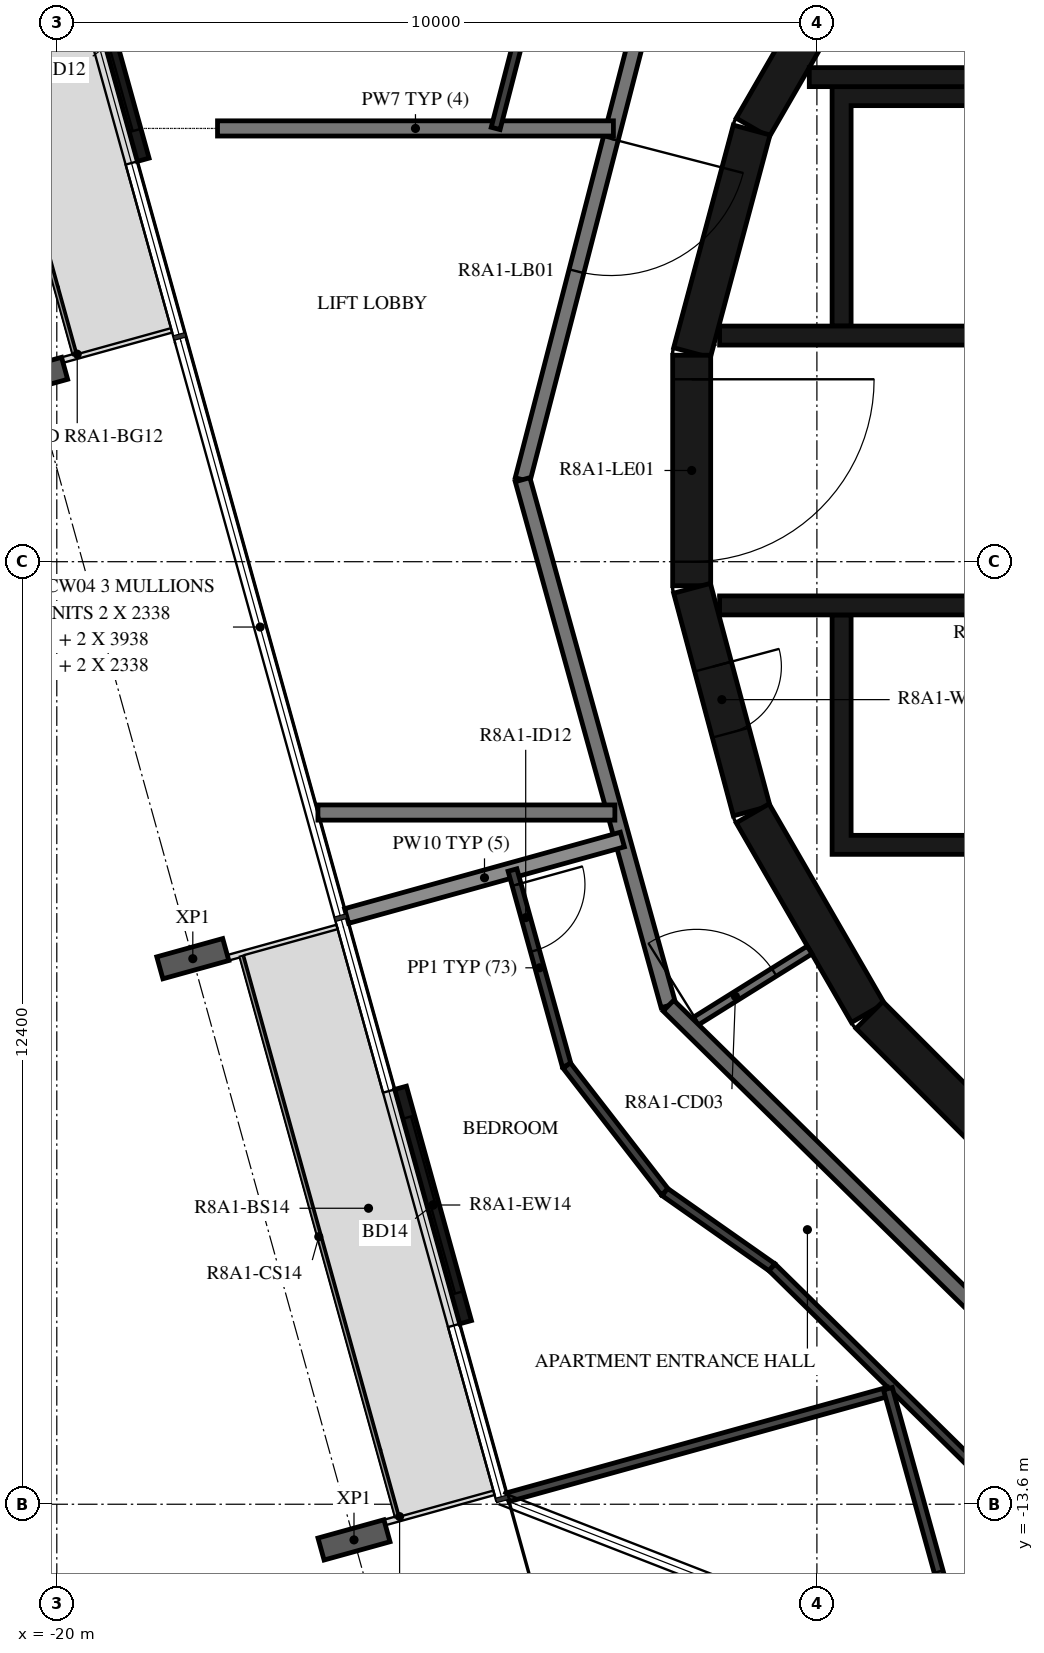
"""IFC4 building model, lengths in metres.
Left out: names, types, materials, properties, quantities, classifications, styles, units other than length and angle.
Written with IfcOpenShell. Run it as: python <this file> out.ifc"""

import sys

from ifc_helpers import new_model, si_unit, direction, frame, frame_2d, origin, origin_2d, place, context, subcontext, project, spatial, polyline, rectangle, i_section, outline, extrude, element, fill, save


model = new_model("IFC4")
c1 = context("Model", 3, precision=1e-05, world=origin(), true_north=direction((0.0, 1.0)))
c2 = subcontext(c1, "Body", "Model", "MODEL_VIEW")
j1 = project(units=[si_unit("LENGTHUNIT", "METRE"), si_unit("PLANEANGLEUNIT", "RADIAN")], contexts=[c1])
p1 = place(None, origin())
s1 = spatial("IfcSite", under=j1, at=p1, CompositionType="ELEMENT")
p2 = place(p1, origin())
s2 = spatial("IfcBuilding", under=s1, at=p2, CompositionType="ELEMENT")
p3 = place(p2, frame((0.0, 0.0, 301.7)))
s3 = spatial("IfcBuildingStorey", under=s2, at=p3, CompositionType="ELEMENT", Elevation=301.7)
for number, where, z_axis, x_axis in (
    (1, (-20.331, 1.224, -0.38), (0.0, 0.0, 1.0), (-0.267, 0.964, 0.0)),
    (2, (-18.211, -6.423, -0.38), (0.0, 0.0, 1.0), (-0.267, 0.964, 0.0)),
    (3, (-16.09, -14.069, -0.38), (0.0, 0.0, 1.0), (-0.267, 0.964, 0.0)),
):
    element("IfcColumn", number, at=place(p3, frame(where, z_axis=z_axis, x_axis=x_axis)), inside=s3, PredefinedType="COLUMN", context=c2, shape_type="SweptSolid", body=[
        extrude(i_section(OverallWidth=0.3, OverallDepth=0.9, WebThickness=0.019, FlangeThickness=0.035, FilletRadius=0.03, at=origin_2d()), origin(), (0.0, 0.0, 1.0), 3.5),
    ])
p4 = place(p3, frame((-19.718, 7.171, 0.0), z_axis=(0.0, 0.0, 1.0), x_axis=(0.267266077957, -0.963622770369, 0.0)))
e4 = element("IfcWall", 4, at=p4, inside=s3, PredefinedType="STANDARD", context=c2, shape_type="SweptSolid", body=[
    extrude(rectangle(XDim=3.2, YDim=0.16, at=frame_2d((1.6, 0.0))), origin(), (0.0, 0.0, 1.0), 3.12),
])
p5 = place(p4, frame((0.4, 0.0, 0.0)))
e5 = element("IfcOpeningElement", 5, at=p5, cuts=e4, PredefinedType="OPENING", context=c2, shape_type="SweptSolid", body=[
    extrude(rectangle(XDim=2.4, YDim=2.4, at=frame_2d((1.2, 1.2))), frame((0.0, 0.09, 0.0), z_axis=(0.0, -1.0, 0.0), x_axis=(1.0, 0.0, 0.0)), (0.0, 0.0, 1.0), 0.18),
])
p6 = place(p3, frame((-15.477, -8.122, 0.0), z_axis=(0.0, 0.0, 1.0), x_axis=(0.267195229387, -0.963642417805, 0.0)))
e6 = element("IfcWall", 6, at=p6, inside=s3, PredefinedType="STANDARD", context=c2, shape_type="SweptSolid", body=[
    extrude(rectangle(XDim=3.2, YDim=0.16, at=frame_2d((1.6, 0.0))), origin(), (0.0, 0.0, 1.0), 3.12),
])
p7 = place(p6, frame((0.4, 0.0, 0.0)))
e7 = element("IfcOpeningElement", 7, at=p7, cuts=e6, PredefinedType="OPENING", context=c2, shape_type="SweptSolid", body=[
    extrude(rectangle(XDim=2.4, YDim=2.4, at=frame_2d((1.2, 1.2))), frame((0.0, 0.09, 0.0), z_axis=(0.0, -1.0, 0.0), x_axis=(1.0, 0.0, 0.0)), (0.0, 0.0, 1.0), 0.18),
])
for number, where, z_axis, x_axis in (
    (8, (-9.329, 7.137, 0.0), (0.0, 0.0, 1.0), (-0.5, -0.866, 0.0)),
    (9, (-10.858, 4.479, 0.0), (0.0, 0.0, 1.0), (-0.259, -0.966, 0.0)),
):
    element("IfcWall", number, at=place(p3, frame(where, z_axis=z_axis, x_axis=x_axis)), inside=s3, PredefinedType="SHEAR", context=c2, shape_type="SweptSolid", body=[
        extrude(rectangle(XDim=3.033, YDim=0.5, at=frame_2d((1.516, 0.0))), origin(), (0.0, 0.0, 1.0), 3.12),
    ])
p8 = place(p3, frame((-11.647, 1.516, 0.0), z_axis=(0.0, 0.0, 1.0), x_axis=(0.0, -1.0, 0.0)))
e10 = element("IfcWall", 10, at=p8, inside=s3, PredefinedType="SHEAR", context=c2, shape_type="SweptSolid", body=[
    extrude(rectangle(XDim=3.033, YDim=0.5, at=frame_2d((1.516, 0.0))), origin(), (0.0, 0.0, 1.0), 3.12),
])
p9 = place(p8, frame((0.316, 0.0, 0.0)))
e11 = element("IfcOpeningElement", 11, at=p9, cuts=e10, PredefinedType="OPENING", context=c2, shape_type="SweptSolid", body=[
    extrude(rectangle(XDim=2.4, YDim=2.1, at=frame_2d((1.2, 1.05))), frame((0.0, 0.26, 0.0), z_axis=(0.0, -1.0, 0.0), x_axis=(1.0, 0.0, 0.0)), (0.0, 0.0, 1.0), 0.52),
])
p10 = place(p3, frame((-11.643, -1.55, 0.0), z_axis=(0.0, 0.0, 1.0), x_axis=(0.258734743916, -0.965948410781, 0.0)))
e12 = element("IfcWall", 12, at=p10, inside=s3, PredefinedType="SHEAR", context=c2, shape_type="SweptSolid", body=[
    extrude(rectangle(XDim=3.033, YDim=0.5, at=frame_2d((1.516, 0.0))), origin(), (0.0, 0.0, 1.0), 3.12),
])
p11 = place(p10, frame((1.066, 0.0, 0.0)))
e13 = element("IfcOpeningElement", 13, at=p11, cuts=e12, PredefinedType="OPENING", context=c2, shape_type="SweptSolid", body=[
    extrude(rectangle(XDim=0.9, YDim=2.1, at=frame_2d((0.45, 1.05))), frame((0.0, 0.26, 0.0), z_axis=(0.0, -1.0, 0.0), x_axis=(1.0, 0.0, 0.0)), (0.0, 0.0, 1.0), 0.52),
])
p12 = place(p3, frame((-10.845, -4.51, 0.0), z_axis=(0.0, 0.0, 1.0), x_axis=(0.500087131594, -0.865975092491, 0.0)))
e14 = element("IfcWall", 14, at=p12, inside=s3, PredefinedType="SHEAR", context=c2, shape_type="SweptSolid", body=[
    extrude(rectangle(XDim=3.033, YDim=0.5, at=frame_2d((1.516, 0.0))), origin(), (0.0, 0.0, 1.0), 3.12),
])
p13 = place(p3, frame((-9.308, -7.164, 0.0), z_axis=(0.0, 0.0, 1.0), x_axis=(0.707106781187, -0.707106781187, 0.0)))
e15 = element("IfcWall", 15, at=p13, inside=s3, PredefinedType="SHEAR", context=c2, shape_type="SweptSolid", body=[
    extrude(rectangle(XDim=3.032, YDim=0.5, at=frame_2d((1.516, 0.0))), origin(), (0.0, 0.0, 1.0), 3.12),
])
p14 = place(p3, frame((-7.0, 5.175, 0.0), z_axis=(0.0, 0.0, 1.0), x_axis=(-1.0, 0.0, 0.0)))
e16 = element("IfcWall", 16, at=p14, inside=s3, PredefinedType="SHEAR", context=c2, shape_type="SweptSolid", body=[
    extrude(rectangle(XDim=3.1, YDim=0.25, at=frame_2d((1.55, 0.0))), origin(), (0.0, 0.0, 1.0), 3.12),
])
p15 = place(p3, origin())
e17 = element("IfcWall", 17, at=p15, inside=s3, PredefinedType="SHEAR", context=c2, shape_type="SweptSolid", body=[
    extrude(outline(polyline([(-9.8, 1.9), (-9.55, 1.9), (-9.55, 4.8), (-1.2, 4.8), (-1.2, 1.9), (-0.95, 1.9), (-0.95, 4.8), (3.1, 4.8), (3.1, 1.9), (3.35, 1.9), (3.35, 4.8), (5.25, 4.8), (5.25, 1.9), (5.5, 1.9), (5.5, 4.8), (7.4, 4.8), (7.4, 1.9), (7.65, 1.9), (7.65, 4.8), (9.55, 4.8), (9.55, 1.9), (9.8, 1.9), (9.8, 4.8), (9.8, 5.05), (-9.8, 5.05), (-9.8, 4.8), (-9.8, 1.9)])), origin(), (0.0, 0.0, 1.0), 3.12),
])
p16 = place(p3, origin())
e18 = element("IfcWall", 18, at=p16, inside=s3, PredefinedType="SHEAR", context=c2, shape_type="SweptSolid", body=[
    extrude(outline(polyline([(9.8, -5.05), (9.8, -4.8), (9.8, -1.9), (9.55, -1.9), (9.55, -4.8), (7.65, -4.8), (7.65, -1.9), (7.4, -1.9), (7.4, -4.8), (5.5, -4.8), (5.5, -1.9), (5.25, -1.9), (5.25, -4.8), (3.35, -4.8), (3.35, -1.9), (3.1, -1.9), (3.1, -4.8), (1.2, -4.8), (1.2, -1.9), (0.95, -1.9), (0.95, -4.8), (-0.95, -4.8), (-0.95, -1.9), (-1.2, -1.9), (-1.2, -4.8), (-3.1, -4.8), (-3.1, -1.9), (-3.35, -1.9), (-3.35, -4.8), (-5.25, -4.8), (-5.25, -1.9), (-5.5, -1.9), (-5.5, -4.8), (-9.55, -4.8), (-9.55, -1.9), (-9.8, -1.9), (-9.8, -4.8), (-9.8, -5.05), (9.8, -5.05)])), origin(), (0.0, 0.0, 1.0), 3.12),
])
p17 = place(p3, frame((-11.28, 1.775, 0.0), z_axis=(0.0, 0.0, 1.0), x_axis=(1.0, 0.0, 0.0)))
e19 = element("IfcWall", 19, at=p17, inside=s3, PredefinedType="SHEAR", context=c2, shape_type="SweptSolid", body=[
    extrude(rectangle(XDim=14.38, YDim=0.25, at=frame_2d((7.19, 0.0))), origin(), (0.0, 0.0, 1.0), 3.12),
])
p18 = place(p17, frame((5.455, 0.0, 0.0)))
e20 = element("IfcOpeningElement", 20, at=p18, cuts=e19, PredefinedType="OPENING", context=c2, shape_type="SweptSolid", body=[
    extrude(rectangle(XDim=0.9, YDim=2.1, at=frame_2d((0.45, 1.05))), frame((0.0, 0.135, 0.0), z_axis=(0.0, -1.0, 0.0), x_axis=(1.0, 0.0, 0.0)), (0.0, 0.0, 1.0), 0.27),
])
p19 = place(p17, frame((11.905, 0.0, 0.0)))
e21 = element("IfcOpeningElement", 21, at=p19, cuts=e19, PredefinedType="OPENING", context=c2, shape_type="SweptSolid", body=[
    extrude(rectangle(XDim=0.9, YDim=2.1, at=frame_2d((0.45, 1.05))), frame((0.0, 0.135, 0.0), z_axis=(0.0, -1.0, 0.0), x_axis=(1.0, 0.0, 0.0)), (0.0, 0.0, 1.0), 0.27),
])
p20 = place(p3, frame((-11.28, -1.775, 0.0), z_axis=(0.0, 0.0, 1.0), x_axis=(1.0, 0.0, 0.0)))
e22 = element("IfcWall", 22, at=p20, inside=s3, PredefinedType="SHEAR", context=c2, shape_type="SweptSolid", body=[
    extrude(rectangle(XDim=14.38, YDim=0.25, at=frame_2d((7.19, 0.0))), origin(), (0.0, 0.0, 1.0), 3.12),
])
p21 = place(p20, frame((6.43, 0.0, 0.0)))
e23 = element("IfcOpeningElement", 23, at=p21, cuts=e22, PredefinedType="OPENING", context=c2, shape_type="SweptSolid", body=[
    extrude(rectangle(XDim=1.1, YDim=2.1, at=frame_2d((0.55, 1.05))), frame((0.0, 0.135, 0.0), z_axis=(0.0, -1.0, 0.0), x_axis=(1.0, 0.0, 0.0)), (0.0, 0.0, 1.0), 0.27),
])
p22 = place(p20, frame((8.58, 0.0, 0.0)))
e24 = element("IfcOpeningElement", 24, at=p22, cuts=e22, PredefinedType="OPENING", context=c2, shape_type="SweptSolid", body=[
    extrude(rectangle(XDim=1.1, YDim=2.1, at=frame_2d((0.55, 1.05))), frame((0.0, 0.135, 0.0), z_axis=(0.0, -1.0, 0.0), x_axis=(1.0, 0.0, 0.0)), (0.0, 0.0, 1.0), 0.27),
])
p23 = place(p20, frame((10.73, 0.0, 0.0)))
e25 = element("IfcOpeningElement", 25, at=p23, cuts=e22, PredefinedType="OPENING", context=c2, shape_type="SweptSolid", body=[
    extrude(rectangle(XDim=1.1, YDim=2.1, at=frame_2d((0.55, 1.05))), frame((0.0, 0.135, 0.0), z_axis=(0.0, -1.0, 0.0), x_axis=(1.0, 0.0, 0.0)), (0.0, 0.0, 1.0), 0.27),
])
p24 = place(p20, frame((3.305, 0.0, 0.0)))
e26 = element("IfcOpeningElement", 26, at=p24, cuts=e22, PredefinedType="OPENING", context=c2, shape_type="SweptSolid", body=[
    extrude(rectangle(XDim=0.9, YDim=2.1, at=frame_2d((0.45, 1.05))), frame((0.0, 0.135, 0.0), z_axis=(0.0, -1.0, 0.0), x_axis=(1.0, 0.0, 0.0)), (0.0, 0.0, 1.0), 0.27),
])
p25 = place(p20, frame((12.98, 0.0, 0.0)))
e27 = element("IfcOpeningElement", 27, at=p25, cuts=e22, PredefinedType="OPENING", context=c2, shape_type="SweptSolid", body=[
    extrude(rectangle(XDim=0.9, YDim=2.1, at=frame_2d((0.45, 1.05))), frame((0.0, 0.135, 0.0), z_axis=(0.0, -1.0, 0.0), x_axis=(1.0, 0.0, 0.0)), (0.0, 0.0, 1.0), 0.27),
])
p26 = place(p3, frame((-11.687, -7.303, 0.0), z_axis=(0.0, 0.0, 1.0), x_axis=(0.848064094072, 0.529893661357, 0.0)))
e28 = element("IfcWall", 28, at=p26, inside=s3, PredefinedType="PARTITIONING", context=c2, shape_type="SweptSolid", body=[
    extrude(rectangle(XDim=1.876, YDim=0.12, at=frame_2d((0.938, 0.0))), origin(), (0.0, 0.0, 1.0), 3.12),
])
p27 = place(p26, frame((0.125, 0.0, 0.0)))
e29 = element("IfcOpeningElement", 29, at=p27, cuts=e28, PredefinedType="OPENING", context=c2, shape_type="SweptSolid", body=[
    extrude(rectangle(XDim=1.2, YDim=2.1, at=frame_2d((0.6, 1.05))), frame((0.0, 0.07, 0.0), z_axis=(0.0, -1.0, 0.0), x_axis=(1.0, 0.0, 0.0)), (0.0, 0.0, 1.0), 0.14),
])
p28 = place(p3, frame((-12.074, 6.831, 0.0), z_axis=(0.0, 0.0, 1.0), x_axis=(-0.250391063186, -0.968144780225, 0.0)))
e30 = element("IfcWall", 30, at=p28, inside=s3, PredefinedType="STANDARD", context=c2, shape_type="SweptSolid", body=[
    extrude(rectangle(XDim=7.181, YDim=0.2, at=frame_2d((3.591, 0.0))), origin(), (0.0, 0.0, 1.0), 3.12),
])
p29 = place(p28, frame((2.548, 0.0, 0.0)))
e31 = element("IfcOpeningElement", 31, at=p29, cuts=e30, PredefinedType="OPENING", context=c2, shape_type="SweptSolid", body=[
    extrude(rectangle(XDim=1.8, YDim=2.1, at=frame_2d((0.9, 1.05))), frame((0.0, 0.11, 0.0), z_axis=(0.0, -1.0, 0.0), x_axis=(1.0, 0.0, 0.0)), (0.0, 0.0, 1.0), 0.22),
])
p30 = place(p3, frame((-13.872, -0.121, 0.0), z_axis=(0.0, 0.0, 1.0), x_axis=(0.267254575108, -0.963625960674, 0.0)))
e32 = element("IfcWall", 32, at=p30, inside=s3, PredefinedType="STANDARD", context=c2, shape_type="SweptSolid", body=[
    extrude(rectangle(XDim=7.181, YDim=0.2, at=frame_2d((3.591, 0.0))), origin(), (0.0, 0.0, 1.0), 3.12),
])
p31 = place(p3, frame((-11.953, -7.041, 0.0), z_axis=(0.0, 0.0, 1.0), x_axis=(0.713250549143, -0.70090916255, 0.0)))
e33 = element("IfcWall", 33, at=p31, inside=s3, PredefinedType="STANDARD", context=c2, shape_type="SweptSolid", body=[
    extrude(rectangle(XDim=7.181, YDim=0.2, at=frame_2d((3.59, 0.0))), origin(), (0.0, 0.0, 1.0), 3.12),
])
p32 = place(p3, frame((-12.677, 4.5, 0.0), z_axis=(0.0, 0.0, 1.0), x_axis=(-1.0, 0.0, 0.0)))
e34 = element("IfcWall", 34, at=p32, inside=s3, PredefinedType="STANDARD", context=c2, shape_type="SweptSolid", body=[
    extrude(rectangle(XDim=5.208, YDim=0.2, at=frame_2d((2.604, 0.0))), origin(), (0.0, 0.0, 1.0), 3.12),
])
p33 = place(p3, frame((-16.564, -4.5, 0.0), z_axis=(0.0, 0.0, 1.0), x_axis=(1.0, 0.0, 0.0)))
e35 = element("IfcWall", 35, at=p33, inside=s3, PredefinedType="STANDARD", context=c2, shape_type="SweptSolid", body=[
    extrude(rectangle(XDim=3.907, YDim=0.2, at=frame_2d((1.953, 0.0))), origin(), (0.0, 0.0, 1.0), 3.12),
])
p34 = place(p3, frame((-16.187, -5.862, 0.0), z_axis=(0.0, 0.0, 1.0), x_axis=(0.963631166683, 0.267235803358, 0.0)))
e36 = element("IfcWall", 36, at=p34, inside=s3, PredefinedType="STANDARD", context=c2, shape_type="SweptSolid", body=[
    extrude(rectangle(XDim=3.765, YDim=0.2, at=frame_2d((1.882, 0.0))), origin(), (0.0, 0.0, 1.0), 2.73),
])
p35 = place(p3, frame((-13.701, 6.533, 0.0), z_axis=(0.0, 0.0, 1.0), x_axis=(-0.250352755349, -0.968154686963, 0.0)))
e37 = element("IfcWall", 37, at=p35, inside=s3, PredefinedType="PARTITIONING", context=c2, shape_type="SweptSolid", body=[
    extrude(rectangle(XDim=2.1, YDim=0.12, at=frame_2d((1.05, 0.0))), origin(), (0.0, 0.0, 1.0), 3.12),
])
p36 = place(p3, frame((-14.005, -5.256, 0.0), z_axis=(0.0, 0.0, 1.0), x_axis=(0.267200500487, -0.963640956238, 0.0)))
e38 = element("IfcWall", 38, at=p36, inside=s3, PredefinedType="PARTITIONING", context=c2, shape_type="SweptSolid", body=[
    extrude(rectangle(XDim=2.67, YDim=0.12, at=frame_2d((1.335, 0.0))), origin(), (0.0, 0.0, 1.0), 3.12),
])
p37 = place(p36, frame((0.2, 0.0, 0.0)))
e39 = element("IfcOpeningElement", 39, at=p37, cuts=e38, PredefinedType="OPENING", context=c2, shape_type="SweptSolid", body=[
    extrude(rectangle(XDim=0.9, YDim=2.1, at=frame_2d((0.45, 1.05))), frame((0.0, 0.07, 0.0), z_axis=(0.0, -1.0, 0.0), x_axis=(1.0, 0.0, 0.0)), (0.0, 0.0, 1.0), 0.14),
])
p38 = place(p3, frame((-13.291, -7.829, 0.0), z_axis=(0.0, 0.0, 1.0), x_axis=(0.613017069232, -0.790069663277, 0.0)))
e40 = element("IfcWall", 40, at=p38, inside=s3, PredefinedType="PARTITIONING", context=c2, shape_type="SweptSolid", body=[
    extrude(rectangle(XDim=2.106, YDim=0.12, at=frame_2d((1.053, 0.0))), origin(), (0.0, 0.0, 1.0), 3.12),
])
p39 = place(p3, frame((-12.0, -9.493, 0.0), z_axis=(0.0, 0.0, 1.0), x_axis=(0.818312362022, -0.57477376259, 0.0)))
e41 = element("IfcWall", 41, at=p39, inside=s3, PredefinedType="PARTITIONING", context=c2, shape_type="SweptSolid", body=[
    extrude(rectangle(XDim=1.723, YDim=0.12, at=frame_2d((0.862, 0.0))), origin(), (0.0, 0.0, 1.0), 3.12),
])
p40 = place(p3, frame((-10.59, -10.483, 0.0), z_axis=(0.0, 0.0, 1.0), x_axis=(0.713244109461, -0.70091571556, 0.0)))
e42 = element("IfcWall", 42, at=p40, inside=s3, PredefinedType="PARTITIONING", context=c2, shape_type="SweptSolid", body=[
    extrude(rectangle(XDim=4.198, YDim=0.12, at=frame_2d((2.099, 0.0))), origin(), (0.0, 0.0, 1.0), 3.12),
])
p41 = place(p3, frame((-14.066, -13.508, 0.0), z_axis=(0.0, 0.0, 1.0), x_axis=(0.963643585504, 0.267191018032, 0.0)))
e43 = element("IfcWall", 43, at=p41, inside=s3, PredefinedType="PARTITIONING", context=c2, shape_type="SweptSolid", body=[
    extrude(rectangle(XDim=5.2, YDim=0.12, at=frame_2d((2.6, 0.0))), origin(), (0.0, 0.0, 1.0), 2.73),
])
p42 = place(p3, frame((-7.368, -18.202, 0.0), z_axis=(0.0, 0.0, 1.0), x_axis=(-0.26723158658, 0.963632336077, 0.0)))
e44 = element("IfcWall", 44, at=p42, inside=s3, PredefinedType="PARTITIONING", context=c2, shape_type="SweptSolid", body=[
    extrude(rectangle(XDim=6.353, YDim=0.12, at=frame_2d((3.177, 0.0))), origin(), (0.0, 0.0, 1.0), 3.12),
])
p43 = place(p42, frame((2.956, 0.0, 0.0)))
e45 = element("IfcOpeningElement", 45, at=p43, cuts=e44, PredefinedType="OPENING", context=c2, shape_type="SweptSolid", body=[
    extrude(rectangle(XDim=0.9, YDim=2.1, at=frame_2d((0.45, 1.05))), frame((0.0, 0.07, 0.0), z_axis=(0.0, -1.0, 0.0), x_axis=(1.0, 0.0, 0.0)), (0.0, 0.0, 1.0), 0.14),
])
p44 = place(p5, origin())
e46 = element("IfcDoor", 46, at=p44, inside=s3, OperationType="DOUBLE_DOOR_SLIDING", PredefinedType="DOOR", context=c2, shape_type="SweptSolid", body=[
    extrude(rectangle(XDim=2.4, YDim=2.4, at=frame_2d((1.2, 1.2))), frame((0.0, 0.025, 0.0), z_axis=(0.0, -1.0, 0.0), x_axis=(1.0, 0.0, 0.0)), (0.0, 0.0, 1.0), 0.05),
])
fill(e5, e46)
p45 = place(p7, origin())
e47 = element("IfcDoor", 47, at=p45, inside=s3, OperationType="DOUBLE_DOOR_SLIDING", PredefinedType="DOOR", context=c2, shape_type="SweptSolid", body=[
    extrude(rectangle(XDim=2.4, YDim=2.4, at=frame_2d((1.2, 1.2))), frame((0.0, 0.025, 0.0), z_axis=(0.0, -1.0, 0.0), x_axis=(1.0, 0.0, 0.0)), (0.0, 0.0, 1.0), 0.05),
])
fill(e7, e47)
p46 = place(p9, origin())
e48 = element("IfcDoor", 48, at=p46, inside=s3, OperationType="DOUBLE_DOOR_SINGLE_SWING", PredefinedType="DOOR", context=c2, shape_type="SweptSolid", body=[
    extrude(rectangle(XDim=2.4, YDim=2.1, at=frame_2d((1.2, 1.05))), frame((0.0, 0.025, 0.0), z_axis=(0.0, -1.0, 0.0), x_axis=(1.0, 0.0, 0.0)), (0.0, 0.0, 1.0), 0.05),
])
fill(e11, e48)
p47 = place(p11, origin())
e49 = element("IfcDoor", 49, at=p47, inside=s3, OperationType="SINGLE_SWING_RIGHT", PredefinedType="DOOR", context=c2, shape_type="SweptSolid", body=[
    extrude(rectangle(XDim=0.9, YDim=2.1, at=frame_2d((0.45, 1.05))), frame((0.0, 0.025, 0.0), z_axis=(0.0, -1.0, 0.0), x_axis=(1.0, 0.0, 0.0)), (0.0, 0.0, 1.0), 0.05),
])
fill(e13, e49)
p48 = place(p37, origin())
e50 = element("IfcDoor", 50, at=p48, inside=s3, OperationType="SINGLE_SWING_RIGHT", PredefinedType="DOOR", context=c2, shape_type="SweptSolid", body=[
    extrude(rectangle(XDim=0.9, YDim=2.1, at=frame_2d((0.45, 1.05))), frame((0.0, 0.025, 0.0), z_axis=(0.0, -1.0, 0.0), x_axis=(1.0, 0.0, 0.0)), (0.0, 0.0, 1.0), 0.05),
])
fill(e39, e50)
p49 = place(p43, origin())
e51 = element("IfcDoor", 51, at=p49, inside=s3, OperationType="SINGLE_SWING_RIGHT", PredefinedType="DOOR", context=c2, shape_type="SweptSolid", body=[
    extrude(rectangle(XDim=0.9, YDim=2.1, at=frame_2d((0.45, 1.05))), frame((0.0, 0.025, 0.0), z_axis=(0.0, -1.0, 0.0), x_axis=(1.0, 0.0, 0.0)), (0.0, 0.0, 1.0), 0.05),
])
fill(e45, e51)
p50 = place(p27, origin())
e52 = element("IfcDoor", 52, at=p50, inside=s3, OperationType="DOUBLE_DOOR_SINGLE_SWING", PredefinedType="DOOR", context=c2, shape_type="SweptSolid", body=[
    extrude(rectangle(XDim=1.2, YDim=2.1, at=frame_2d((0.6, 1.05))), frame((0.0, 0.025, 0.0), z_axis=(0.0, -1.0, 0.0), x_axis=(1.0, 0.0, 0.0)), (0.0, 0.0, 1.0), 0.05),
])
fill(e29, e52)
p51 = place(p29, origin())
e53 = element("IfcDoor", 53, at=p51, inside=s3, OperationType="DOUBLE_DOOR_SINGLE_SWING", PredefinedType="DOOR", context=c2, shape_type="SweptSolid", body=[
    extrude(rectangle(XDim=1.8, YDim=2.1, at=frame_2d((0.9, 1.05))), frame((0.0, 0.025, 0.0), z_axis=(0.0, -1.0, 0.0), x_axis=(1.0, 0.0, 0.0)), (0.0, 0.0, 1.0), 0.05),
])
fill(e31, e53)
save(model, sys.argv[1])
